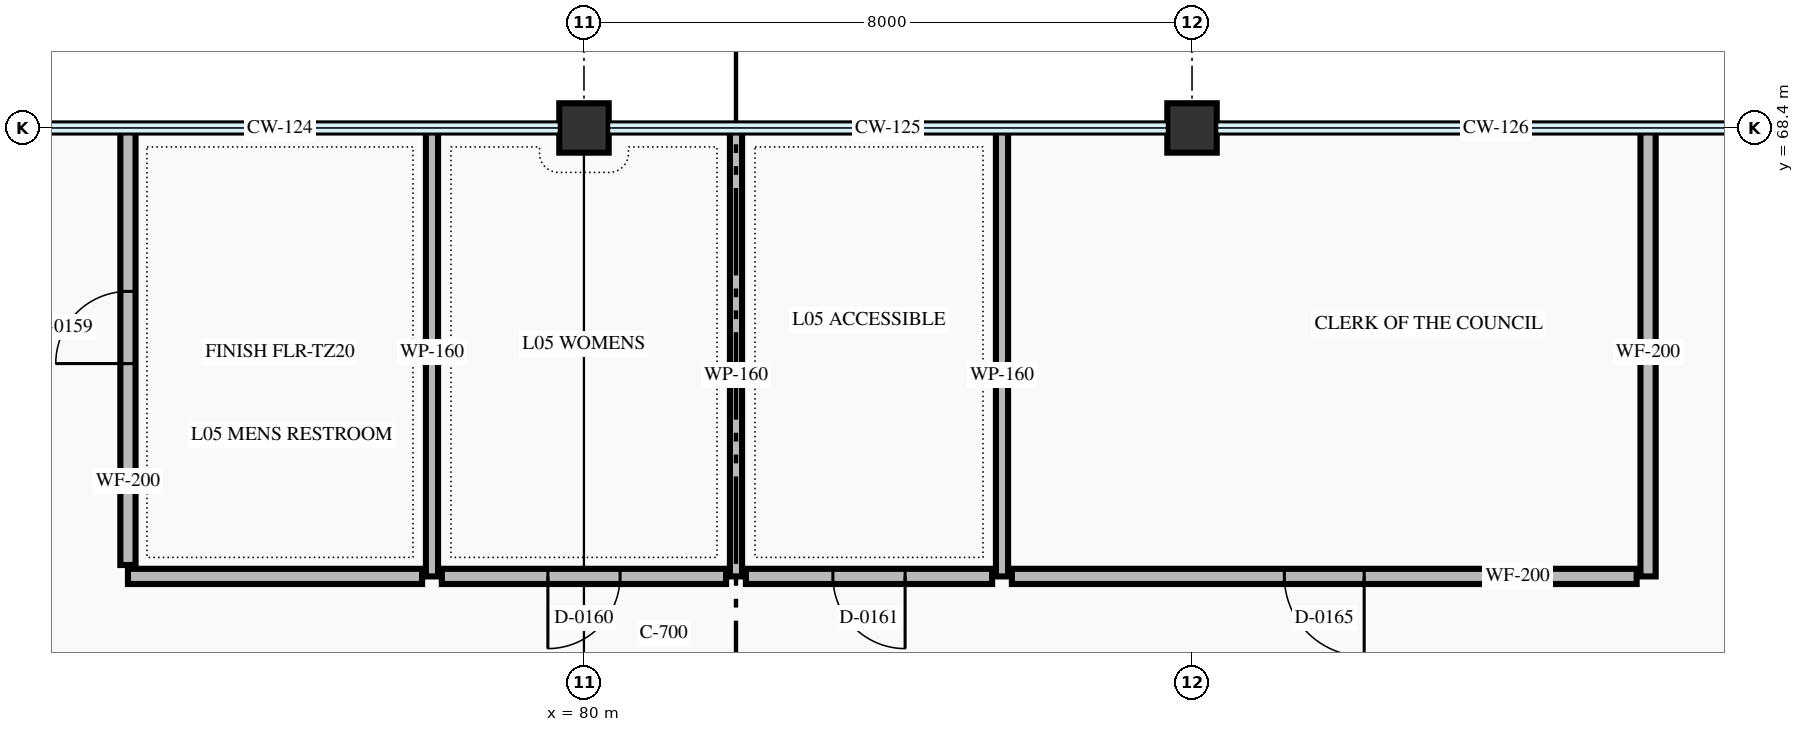
"""IFC4 building model, lengths in metres.
Left out: names, types, materials, properties, quantities, classifications, styles, units other than length and angle.
Written with IfcOpenShell. Run it as: python <this file> out.ifc"""

import sys

from ifc_helpers import new_model, si_unit, direction, frame, frame_2d, origin, origin_2d, place, context, subcontext, project, spatial, rectangle, extrude, element, fill, save


model = new_model("IFC4")
c1 = context("Model", 3, precision=1e-05, world=origin(), true_north=direction((0.0, 1.0)))
c2 = subcontext(c1, "Body", "Model", "MODEL_VIEW")
j1 = project(units=[si_unit("LENGTHUNIT", "METRE"), si_unit("PLANEANGLEUNIT", "RADIAN")], contexts=[c1])
p1 = place(None, origin())
s1 = spatial("IfcSite", under=j1, at=p1, CompositionType="ELEMENT")
p2 = place(p1, origin())
s2 = spatial("IfcBuilding", under=s1, at=p2, CompositionType="ELEMENT")
p3 = place(p2, frame((0.0, 0.0, 18.9)))
s3 = spatial("IfcBuildingStorey", under=s2, at=p3, CompositionType="ELEMENT", Elevation=18.9)
for number, where, z_axis, x_axis in (
    (1, (80.0, 68.4, 0.0), (0.0, 0.0, 1.0), (1.0, 0.0, 0.0)),
    (2, (88.0, 68.4, 0.0), (0.0, 0.0, 1.0), (1.0, 0.0, 0.0)),
):
    element("IfcColumn", number, at=place(p3, frame(where, z_axis=z_axis, x_axis=x_axis)), inside=s3, PredefinedType="COLUMN", context=c2, shape_type="SweptSolid", body=[
        extrude(rectangle(XDim=0.65, YDim=0.65, at=origin_2d()), origin(), (0.0, 0.0, 1.0), 4.8),
    ])
p4 = place(p3, frame((78.0, 68.4, 0.0), z_axis=(0.0, 0.0, 1.0), x_axis=(0.0, -1.0, 0.0)))
e3 = element("IfcWall", 3, at=p4, inside=s3, PredefinedType="PARTITIONING", context=c2, shape_type="SweptSolid", body=[
    extrude(rectangle(XDim=5.9, YDim=0.16, at=frame_2d((2.95, 0.0))), origin(), (0.0, 0.0, 1.0), 4.52),
])
p5 = place(p3, frame((77.87, 62.5, 0.0), z_axis=(0.0, 0.0, 1.0), x_axis=(-1.0, 0.0, 0.0)))
e4 = element("IfcWall", 4, at=p5, inside=s3, PredefinedType="STANDARD", context=c2, shape_type="SweptSolid", body=[
    extrude(rectangle(XDim=3.87, YDim=0.2, at=frame_2d((1.935, 0.0))), origin(), (0.0, 0.0, 1.0), 4.57),
])
p6 = place(p3, frame((74.0, 62.65, 0.0), z_axis=(0.0, 0.0, 1.0), x_axis=(0.0, 1.0, 0.0)))
e5 = element("IfcWall", 5, at=p6, inside=s3, PredefinedType="STANDARD", context=c2, shape_type="SweptSolid", body=[
    extrude(rectangle(XDim=5.75, YDim=0.2, at=frame_2d((2.875, 0.0))), origin(), (0.0, 0.0, 1.0), 4.52),
])
p7 = place(p6, frame((2.65, 0.0, 0.0)))
e6 = element("IfcOpeningElement", 6, at=p7, cuts=e5, PredefinedType="OPENING", context=c2, shape_type="SweptSolid", body=[
    extrude(rectangle(XDim=0.95, YDim=2.15, at=frame_2d((0.475, 1.075))), frame((0.0, 0.11, 0.0), z_axis=(0.0, -1.0, 0.0), x_axis=(1.0, 0.0, 0.0)), (0.0, 0.0, 1.0), 0.22),
])
p8 = place(p3, frame((82.0, 68.4, 0.0), z_axis=(0.0, 0.0, 1.0), x_axis=(0.0, -1.0, 0.0)))
e7 = element("IfcWall", 7, at=p8, inside=s3, PredefinedType="PARTITIONING", context=c2, shape_type="SweptSolid", body=[
    extrude(rectangle(XDim=5.9, YDim=0.16, at=frame_2d((2.95, 0.0))), origin(), (0.0, 0.0, 1.0), 4.52),
])
p9 = place(p3, frame((81.87, 62.5, 0.0), z_axis=(0.0, 0.0, 1.0), x_axis=(-1.0, 0.0, 0.0)))
e8 = element("IfcWall", 8, at=p9, inside=s3, PredefinedType="STANDARD", context=c2, shape_type="SweptSolid", body=[
    extrude(rectangle(XDim=3.74, YDim=0.2, at=frame_2d((1.87, 0.0))), origin(), (0.0, 0.0, 1.0), 4.57),
])
p10 = place(p9, frame((1.395, 0.0, 0.0)))
e9 = element("IfcOpeningElement", 9, at=p10, cuts=e8, PredefinedType="OPENING", context=c2, shape_type="SweptSolid", body=[
    extrude(rectangle(XDim=0.95, YDim=2.15, at=frame_2d((0.475, 1.075))), frame((0.0, 0.11, 0.0), z_axis=(0.0, -1.0, 0.0), x_axis=(1.0, 0.0, 0.0)), (0.0, 0.0, 1.0), 0.22),
])
p11 = place(p3, frame((85.5, 68.4, 0.0), z_axis=(0.0, 0.0, 1.0), x_axis=(0.0, -1.0, 0.0)))
e10 = element("IfcWall", 10, at=p11, inside=s3, PredefinedType="PARTITIONING", context=c2, shape_type="SweptSolid", body=[
    extrude(rectangle(XDim=5.9, YDim=0.16, at=frame_2d((2.95, 0.0))), origin(), (0.0, 0.0, 1.0), 4.52),
])
p12 = place(p3, frame((85.37, 62.5, 0.0), z_axis=(0.0, 0.0, 1.0), x_axis=(-1.0, 0.0, 0.0)))
e11 = element("IfcWall", 11, at=p12, inside=s3, PredefinedType="STANDARD", context=c2, shape_type="SweptSolid", body=[
    extrude(rectangle(XDim=3.24, YDim=0.2, at=frame_2d((1.62, 0.0))), origin(), (0.0, 0.0, 1.0), 4.57),
])
p13 = place(p12, frame((1.145, 0.0, 0.0)))
e12 = element("IfcOpeningElement", 12, at=p13, cuts=e11, PredefinedType="OPENING", context=c2, shape_type="SweptSolid", body=[
    extrude(rectangle(XDim=0.95, YDim=2.15, at=frame_2d((0.475, 1.075))), frame((0.0, 0.11, 0.0), z_axis=(0.0, -1.0, 0.0), x_axis=(1.0, 0.0, 0.0)), (0.0, 0.0, 1.0), 0.22),
])
p14 = place(p3, frame((94.0, 68.4, 0.0), z_axis=(0.0, 0.0, 1.0), x_axis=(0.0, -1.0, 0.0)))
e13 = element("IfcWall", 13, at=p14, inside=s3, PredefinedType="STANDARD", context=c2, shape_type="SweptSolid", body=[
    extrude(rectangle(XDim=5.9, YDim=0.2, at=frame_2d((2.95, 0.0))), origin(), (0.0, 0.0, 1.0), 4.52),
])
p15 = place(p3, frame((93.85, 62.5, 0.0), z_axis=(0.0, 0.0, 1.0), x_axis=(-1.0, 0.0, 0.0)))
e14 = element("IfcWall", 14, at=p15, inside=s3, PredefinedType="STANDARD", context=c2, shape_type="SweptSolid", body=[
    extrude(rectangle(XDim=8.22, YDim=0.2, at=frame_2d((4.11, 0.0))), origin(), (0.0, 0.0, 1.0), 4.57),
])
p16 = place(p15, frame((3.585, 0.0, 0.0)))
e15 = element("IfcOpeningElement", 15, at=p16, cuts=e14, PredefinedType="OPENING", context=c2, shape_type="SweptSolid", body=[
    extrude(rectangle(XDim=1.05, YDim=2.15, at=frame_2d((0.525, 1.075))), frame((0.0, 0.11, 0.0), z_axis=(0.0, -1.0, 0.0), x_axis=(1.0, 0.0, 0.0)), (0.0, 0.0, 1.0), 0.22),
])
p17 = place(p7, origin())
e16 = element("IfcDoor", 16, at=p17, inside=s3, OperationType="SINGLE_SWING_LEFT", PredefinedType="DOOR", context=c2, shape_type="SweptSolid", body=[
    extrude(rectangle(XDim=0.95, YDim=2.15, at=frame_2d((0.475, 1.075))), frame((0.0, 0.025, 0.0), z_axis=(0.0, -1.0, 0.0), x_axis=(1.0, 0.0, 0.0)), (0.0, 0.0, 1.0), 0.05),
])
fill(e6, e16)
p18 = place(p10, origin())
e17 = element("IfcDoor", 17, at=p18, inside=s3, OperationType="SINGLE_SWING_RIGHT", PredefinedType="DOOR", context=c2, shape_type="SweptSolid", body=[
    extrude(rectangle(XDim=0.95, YDim=2.15, at=frame_2d((0.475, 1.075))), frame((0.0, 0.025, 0.0), z_axis=(0.0, -1.0, 0.0), x_axis=(1.0, 0.0, 0.0)), (0.0, 0.0, 1.0), 0.05),
])
fill(e9, e17)
p19 = place(p13, origin())
e18 = element("IfcDoor", 18, at=p19, inside=s3, OperationType="SINGLE_SWING_LEFT", PredefinedType="DOOR", context=c2, shape_type="SweptSolid", body=[
    extrude(rectangle(XDim=0.95, YDim=2.15, at=frame_2d((0.475, 1.075))), frame((0.0, 0.025, 0.0), z_axis=(0.0, -1.0, 0.0), x_axis=(1.0, 0.0, 0.0)), (0.0, 0.0, 1.0), 0.05),
])
fill(e12, e18)
p20 = place(p16, origin())
e19 = element("IfcDoor", 19, at=p20, inside=s3, OperationType="SINGLE_SWING_LEFT", PredefinedType="DOOR", context=c2, shape_type="SweptSolid", body=[
    extrude(rectangle(XDim=1.05, YDim=2.15, at=frame_2d((0.525, 1.075))), frame((0.0, 0.025, 0.0), z_axis=(0.0, -1.0, 0.0), x_axis=(1.0, 0.0, 0.0)), (0.0, 0.0, 1.0), 0.05),
])
fill(e15, e19)
save(model, sys.argv[1])
